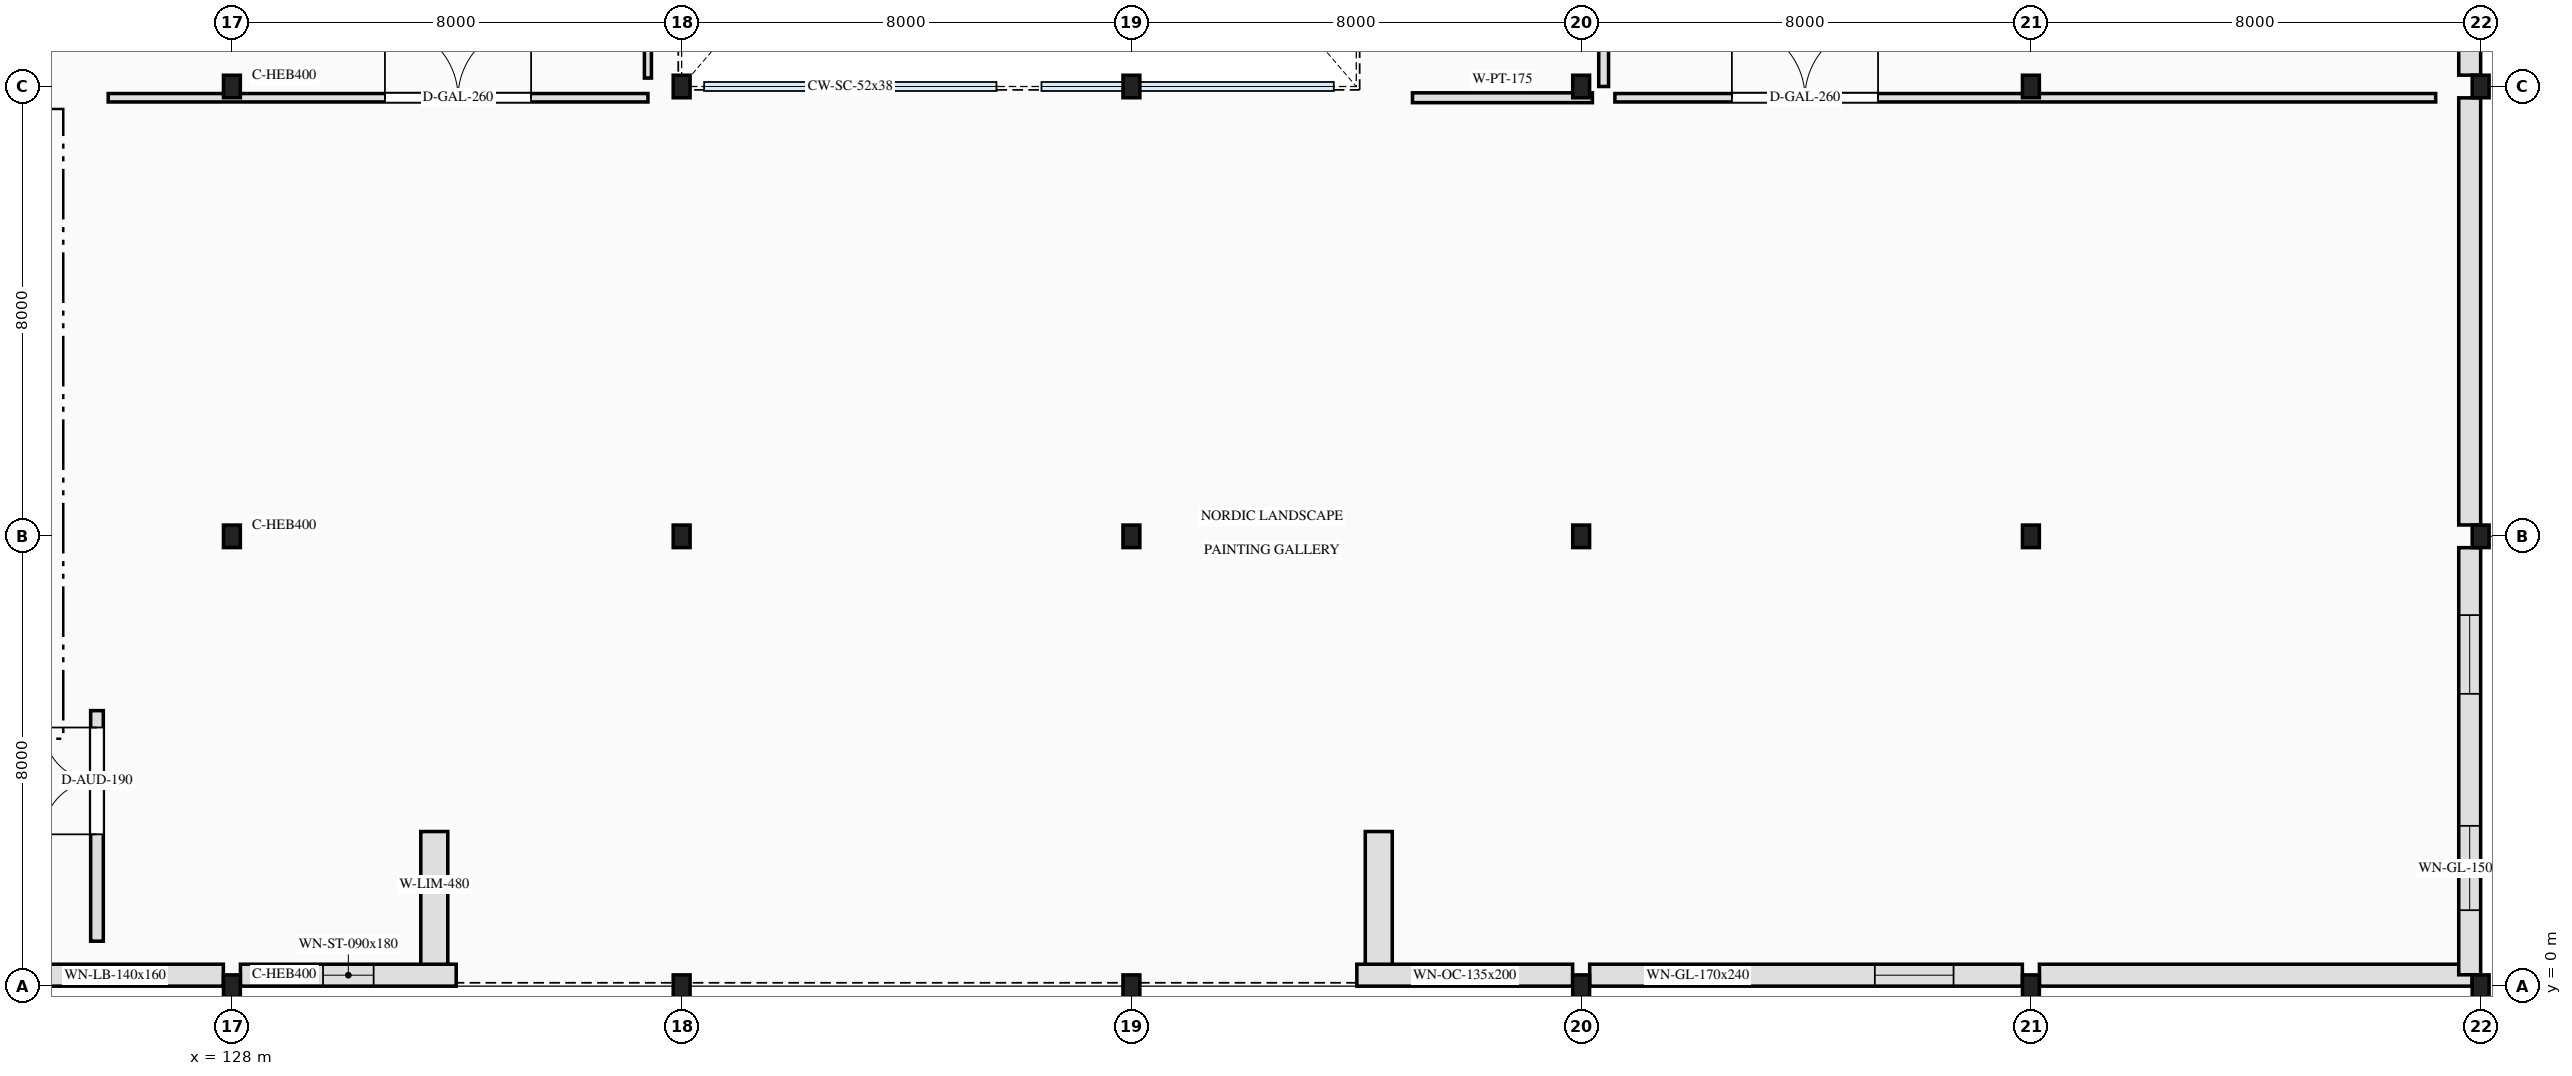
"""IFC4 building model, lengths in metres.
Left out: names, types, materials, properties, quantities, classifications, styles, units other than length and angle.
Written with IfcOpenShell. Run it as: python <this file> out.ifc"""

import sys

from ifc_helpers import new_model, si_unit, direction, frame, frame_2d, origin, origin_2d, place, context, subcontext, project, spatial, rectangle, i_section, extrude, element, fill, save


model = new_model("IFC4")
c1 = context("Model", 3, precision=1e-05, world=origin(), true_north=direction((0.0, 1.0)))
c2 = subcontext(c1, "Body", "Model", "MODEL_VIEW")
j1 = project(units=[si_unit("LENGTHUNIT", "METRE"), si_unit("PLANEANGLEUNIT", "RADIAN")], contexts=[c1])
p1 = place(None, origin())
s1 = spatial("IfcSite", under=j1, at=p1, CompositionType="ELEMENT")
p2 = place(p1, origin())
s2 = spatial("IfcBuilding", under=s1, at=p2, CompositionType="ELEMENT")
p3 = place(p2, frame((0.0, 0.0, 21.8)))
s3 = spatial("IfcBuildingStorey", under=s2, at=p3, CompositionType="ELEMENT", Elevation=21.8)
for number, where, z_axis, x_axis in (
    (1, (128.0, 0.0, 0.0), (0.0, 0.0, 1.0), (1.0, 0.0, 0.0)),
    (2, (128.0, 8.0, 0.0), (0.0, 0.0, 1.0), (1.0, 0.0, 0.0)),
    (3, (128.0, 16.0, 0.0), (0.0, 0.0, 1.0), (1.0, 0.0, 0.0)),
    (4, (136.0, 0.0, 0.0), (0.0, 0.0, 1.0), (1.0, 0.0, 0.0)),
    (5, (136.0, 8.0, 0.0), (0.0, 0.0, 1.0), (1.0, 0.0, 0.0)),
    (6, (136.0, 16.0, 0.0), (0.0, 0.0, 1.0), (1.0, 0.0, 0.0)),
    (7, (144.0, 0.0, 0.0), (0.0, 0.0, 1.0), (1.0, 0.0, 0.0)),
    (8, (144.0, 8.0, 0.0), (0.0, 0.0, 1.0), (1.0, 0.0, 0.0)),
    (9, (144.0, 16.0, 0.0), (0.0, 0.0, 1.0), (1.0, 0.0, 0.0)),
    (10, (152.0, 0.0, 0.0), (0.0, 0.0, 1.0), (1.0, 0.0, 0.0)),
    (11, (152.0, 8.0, 0.0), (0.0, 0.0, 1.0), (1.0, 0.0, 0.0)),
    (12, (152.0, 16.0, 0.0), (0.0, 0.0, 1.0), (1.0, 0.0, 0.0)),
    (13, (160.0, 0.0, 0.0), (0.0, 0.0, 1.0), (1.0, 0.0, 0.0)),
    (14, (160.0, 8.0, 0.0), (0.0, 0.0, 1.0), (1.0, 0.0, 0.0)),
    (15, (160.0, 16.0, 0.0), (0.0, 0.0, 1.0), (1.0, 0.0, 0.0)),
    (16, (168.0, 0.0, 0.0), (0.0, 0.0, 1.0), (1.0, 0.0, 0.0)),
    (17, (168.0, 8.0, 0.0), (0.0, 0.0, 1.0), (1.0, 0.0, 0.0)),
    (18, (168.0, 16.0, 0.0), (0.0, 0.0, 1.0), (1.0, 0.0, 0.0)),
):
    element("IfcColumn", number, at=place(p3, frame(where, z_axis=z_axis, x_axis=x_axis)), inside=s3, PredefinedType="COLUMN", context=c2, shape_type="SweptSolid", body=[
        extrude(i_section(OverallWidth=0.3, OverallDepth=0.4, WebThickness=0.013, FlangeThickness=0.024, FilletRadius=0.027, at=origin_2d()), origin(), (0.0, 0.0, 1.0), 4.2),
    ])
for number, where, z_axis, x_axis in (
    (19, (131.6, 0.24, 0.0), (0.0, 0.0, 1.0), (0.0, 1.0, 0.0)),
    (20, (148.4, 0.24, 0.0), (0.0, 0.0, 1.0), (0.0, 1.0, 0.0)),
):
    element("IfcWall", number, at=place(p3, frame(where, z_axis=z_axis, x_axis=x_axis)), inside=s3, PredefinedType="SOLIDWALL", context=c2, shape_type="SweptSolid", body=[
        extrude(rectangle(XDim=2.51, YDim=0.48, at=frame_2d((1.255, 0.0))), origin(), (0.0, 0.0, 1.0), 3.94),
    ])
p4 = place(p3, frame((127.848, 0.195, 0.0), z_axis=(0.0, 0.0, 1.0), x_axis=(-1.0, 0.0, 0.0)))
e21 = element("IfcWall", 21, at=p4, inside=s3, PredefinedType="SOLIDWALL", context=c2, shape_type="SweptSolid", body=[
    extrude(rectangle(XDim=7.696, YDim=0.39, at=frame_2d((3.848, 0.0))), origin(), (0.0, 0.0, 1.0), 3.415),
])
p5 = place(p4, frame((1.224, 0.0, 0.85)))
e22 = element("IfcOpeningElement", 22, at=p5, cuts=e21, PredefinedType="OPENING", context=c2, shape_type="SweptSolid", body=[
    extrude(rectangle(XDim=1.4, YDim=1.6, at=frame_2d((0.7, 0.8))), frame((0.0, 0.205, 0.0), z_axis=(0.0, -1.0, 0.0), x_axis=(1.0, 0.0, 0.0)), (0.0, 0.0, 1.0), 0.41),
])
p6 = place(p4, frame((5.072, 0.0, 0.85)))
e23 = element("IfcOpeningElement", 23, at=p6, cuts=e21, PredefinedType="OPENING", context=c2, shape_type="SweptSolid", body=[
    extrude(rectangle(XDim=1.4, YDim=1.6, at=frame_2d((0.7, 0.8))), frame((0.0, 0.205, 0.0), z_axis=(0.0, -1.0, 0.0), x_axis=(1.0, 0.0, 0.0)), (0.0, 0.0, 1.0), 0.41),
])
p7 = place(p3, frame((131.99, 0.195, 0.0), z_axis=(0.0, 0.0, 1.0), x_axis=(-1.0, 0.0, 0.0)))
e24 = element("IfcWall", 24, at=p7, inside=s3, PredefinedType="SOLIDWALL", context=c2, shape_type="SweptSolid", body=[
    extrude(rectangle(XDim=3.838, YDim=0.39, at=frame_2d((1.919, 0.0))), origin(), (0.0, 0.0, 1.0), 3.415),
])
p8 = place(p7, frame((1.469, 0.0, 0.85)))
e25 = element("IfcOpeningElement", 25, at=p8, cuts=e24, PredefinedType="OPENING", context=c2, shape_type="SweptSolid", body=[
    extrude(rectangle(XDim=0.9, YDim=1.8, at=frame_2d((0.45, 0.9))), frame((0.0, 0.205, 0.0), z_axis=(0.0, -1.0, 0.0), x_axis=(1.0, 0.0, 0.0)), (0.0, 0.0, 1.0), 0.41),
])
p9 = place(p3, frame((159.848, 0.195, 0.0), z_axis=(0.0, 0.0, 1.0), x_axis=(-1.0, 0.0, 0.0)))
e26 = element("IfcWall", 26, at=p9, inside=s3, PredefinedType="SOLIDWALL", context=c2, shape_type="SweptSolid", body=[
    extrude(rectangle(XDim=7.696, YDim=0.39, at=frame_2d((3.848, 0.0))), origin(), (0.0, 0.0, 1.0), 3.415),
])
p10 = place(p9, frame((1.224, 0.0, 0.85)))
e27 = element("IfcOpeningElement", 27, at=p10, cuts=e26, PredefinedType="OPENING", context=c2, shape_type="SweptSolid", body=[
    extrude(rectangle(XDim=1.4, YDim=1.6, at=frame_2d((0.7, 0.8))), frame((0.0, 0.205, 0.0), z_axis=(0.0, -1.0, 0.0), x_axis=(1.0, 0.0, 0.0)), (0.0, 0.0, 1.0), 0.41),
])
p11 = place(p9, frame((4.922, 0.0, 0.85)))
e28 = element("IfcOpeningElement", 28, at=p11, cuts=e26, PredefinedType="OPENING", context=c2, shape_type="SweptSolid", body=[
    extrude(rectangle(XDim=1.7, YDim=2.4, at=frame_2d((0.85, 1.2))), frame((0.0, 0.205, 0.0), z_axis=(0.0, -1.0, 0.0), x_axis=(1.0, 0.0, 0.0)), (0.0, 0.0, 1.0), 0.41),
])
p12 = place(p3, frame((167.848, 0.195, 0.0), z_axis=(0.0, 0.0, 1.0), x_axis=(-1.0, 0.0, 0.0)))
e29 = element("IfcWall", 29, at=p12, inside=s3, PredefinedType="SOLIDWALL", context=c2, shape_type="SweptSolid", body=[
    extrude(rectangle(XDim=7.696, YDim=0.39, at=frame_2d((3.848, 0.0))), origin(), (0.0, 0.0, 1.0), 3.415),
])
p13 = place(p3, frame((151.848, 0.195, 0.0), z_axis=(0.0, 0.0, 1.0), x_axis=(-1.0, 0.0, 0.0)))
e30 = element("IfcWall", 30, at=p13, inside=s3, PredefinedType="SOLIDWALL", context=c2, shape_type="SweptSolid", body=[
    extrude(rectangle(XDim=3.838, YDim=0.39, at=frame_2d((1.919, 0.0))), origin(), (0.0, 0.0, 1.0), 3.415),
])
p14 = place(p13, frame((1.244, 0.0, 0.85)))
e31 = element("IfcOpeningElement", 31, at=p14, cuts=e30, PredefinedType="OPENING", context=c2, shape_type="SweptSolid", body=[
    extrude(rectangle(XDim=1.35, YDim=2.0, at=frame_2d((0.675, 1.0))), frame((0.0, 0.205, 0.0), z_axis=(0.0, -1.0, 0.0), x_axis=(1.0, 0.0, 0.0)), (0.0, 0.0, 1.0), 0.41),
])
p15 = place(p3, frame((167.805, 7.798, 0.0), z_axis=(0.0, 0.0, 1.0), x_axis=(0.0, -1.0, 0.0)))
e32 = element("IfcWall", 32, at=p15, inside=s3, PredefinedType="SOLIDWALL", context=c2, shape_type="SweptSolid", body=[
    extrude(rectangle(XDim=7.596, YDim=0.39, at=frame_2d((3.798, 0.0))), origin(), (0.0, 0.0, 1.0), 3.415),
])
p16 = place(p15, frame((1.199, 0.0, 0.85)))
e33 = element("IfcOpeningElement", 33, at=p16, cuts=e32, PredefinedType="OPENING", context=c2, shape_type="SweptSolid", body=[
    extrude(rectangle(XDim=1.4, YDim=1.6, at=frame_2d((0.7, 0.8))), frame((0.0, 0.205, 0.0), z_axis=(0.0, -1.0, 0.0), x_axis=(1.0, 0.0, 0.0)), (0.0, 0.0, 1.0), 0.41),
])
p17 = place(p15, frame((4.947, 0.0, 0.85)))
e34 = element("IfcOpeningElement", 34, at=p17, cuts=e32, PredefinedType="OPENING", context=c2, shape_type="SweptSolid", body=[
    extrude(rectangle(XDim=1.5, YDim=2.4, at=frame_2d((0.75, 1.2))), frame((0.0, 0.205, 0.0), z_axis=(0.0, -1.0, 0.0), x_axis=(1.0, 0.0, 0.0)), (0.0, 0.0, 1.0), 0.41),
])
p18 = place(p3, frame((167.805, 15.798, 0.0), z_axis=(0.0, 0.0, 1.0), x_axis=(0.0, -1.0, 0.0)))
e35 = element("IfcWall", 35, at=p18, inside=s3, PredefinedType="SOLIDWALL", context=c2, shape_type="SweptSolid", body=[
    extrude(rectangle(XDim=7.596, YDim=0.39, at=frame_2d((3.798, 0.0))), origin(), (0.0, 0.0, 1.0), 3.415),
])
p19 = place(p3, frame((167.805, 23.798, 0.0), z_axis=(0.0, 0.0, 1.0), x_axis=(0.0, -1.0, 0.0)))
e36 = element("IfcWall", 36, at=p19, inside=s3, PredefinedType="SOLIDWALL", context=c2, shape_type="SweptSolid", body=[
    extrude(rectangle(XDim=7.596, YDim=0.39, at=frame_2d((3.798, 0.0))), origin(), (0.0, 0.0, 1.0), 3.415),
])
p20 = place(p19, frame((1.199, 0.0, 0.85)))
e37 = element("IfcOpeningElement", 37, at=p20, cuts=e36, PredefinedType="OPENING", context=c2, shape_type="SweptSolid", body=[
    extrude(rectangle(XDim=1.4, YDim=1.6, at=frame_2d((0.7, 0.8))), frame((0.0, 0.205, 0.0), z_axis=(0.0, -1.0, 0.0), x_axis=(1.0, 0.0, 0.0)), (0.0, 0.0, 1.0), 0.41),
])
p21 = place(p19, frame((4.947, 0.0, 0.85)))
e38 = element("IfcOpeningElement", 38, at=p21, cuts=e36, PredefinedType="OPENING", context=c2, shape_type="SweptSolid", body=[
    extrude(rectangle(XDim=1.5, YDim=2.4, at=frame_2d((0.75, 1.2))), frame((0.0, 0.205, 0.0), z_axis=(0.0, -1.0, 0.0), x_axis=(1.0, 0.0, 0.0)), (0.0, 0.0, 1.0), 0.41),
])
p22 = place(p3, frame((125.6, 0.8, 0.0), z_axis=(0.0, 0.0, 1.0), x_axis=(0.0, 1.0, 0.0)))
e39 = element("IfcWall", 39, at=p22, inside=s3, PredefinedType="SOLIDWALL", context=c2, shape_type="SweptSolid", body=[
    extrude(rectangle(XDim=4.1, YDim=0.225, at=frame_2d((2.05, 0.0))), origin(), (0.0, 0.0, 1.0), 3.92),
])
p23 = place(p22, frame((1.9, 0.0, 0.0)))
e40 = element("IfcOpeningElement", 40, at=p23, cuts=e39, PredefinedType="OPENING", context=c2, shape_type="SweptSolid", body=[
    extrude(rectangle(XDim=1.9, YDim=2.35, at=frame_2d((0.95, 1.175))), frame((0.0, 0.123, 0.0), z_axis=(0.0, -1.0, 0.0), x_axis=(1.0, 0.0, 0.0)), (0.0, 0.0, 1.0), 0.245),
])
p24 = place(p3, frame((149.0, 15.8, 0.0), z_axis=(0.0, 0.0, 1.0), x_axis=(1.0, 0.0, 0.0)))
e41 = element("IfcWall", 41, at=p24, inside=s3, PredefinedType="PARTITIONING", context=c2, shape_type="SweptSolid", body=[
    extrude(rectangle(XDim=3.2, YDim=0.175, at=frame_2d((1.6, 0.0))), origin(), (0.0, 0.0, 1.0), 3.48),
])
p25 = place(p3, frame((152.4, 16.0, 0.0), z_axis=(0.0, 0.0, 1.0), x_axis=(0.0, 1.0, 0.0)))
e42 = element("IfcWall", 42, at=p25, inside=s3, PredefinedType="PARTITIONING", context=c2, shape_type="SweptSolid", body=[
    extrude(rectangle(XDim=16.6, YDim=0.175, at=frame_2d((8.3, 0.0))), origin(), (0.0, 0.0, 1.0), 3.92),
])
p26 = place(p25, frame((3.12, 0.0, 0.0)))
e43 = element("IfcOpeningElement", 43, at=p26, cuts=e42, PredefinedType="OPENING", context=c2, shape_type="SweptSolid", body=[
    extrude(rectangle(XDim=1.9, YDim=2.35, at=frame_2d((0.95, 1.175))), frame((0.0, 0.097, 0.0), z_axis=(0.0, -1.0, 0.0), x_axis=(1.0, 0.0, 0.0)), (0.0, 0.0, 1.0), 0.195),
])
p27 = place(p3, frame((152.6, 15.8, 0.0), z_axis=(0.0, 0.0, 1.0), x_axis=(1.0, 0.0, 0.0)))
e44 = element("IfcWall", 44, at=p27, inside=s3, PredefinedType="PARTITIONING", context=c2, shape_type="SweptSolid", body=[
    extrude(rectangle(XDim=14.6, YDim=0.15, at=frame_2d((7.3, 0.0))), origin(), (0.0, 0.0, 1.0), 3.48),
])
p28 = place(p27, frame((2.081, 0.0, 0.0)))
e45 = element("IfcOpeningElement", 45, at=p28, cuts=e44, PredefinedType="OPENING", context=c2, shape_type="SweptSolid", body=[
    extrude(rectangle(XDim=2.6, YDim=2.9, at=frame_2d((1.3, 1.45))), frame((0.0, 0.085, 0.0), z_axis=(0.0, -1.0, 0.0), x_axis=(1.0, 0.0, 0.0)), (0.0, 0.0, 1.0), 0.17),
])
p29 = place(p3, frame((125.8, 15.8, 0.0), z_axis=(0.0, 0.0, 1.0), x_axis=(1.0, 0.0, 0.0)))
e46 = element("IfcWall", 46, at=p29, inside=s3, PredefinedType="PARTITIONING", context=c2, shape_type="SweptSolid", body=[
    extrude(rectangle(XDim=9.6, YDim=0.15, at=frame_2d((4.8, 0.0))), origin(), (0.0, 0.0, 1.0), 3.48),
])
p30 = place(p29, frame((4.922, 0.0, 0.0)))
e47 = element("IfcOpeningElement", 47, at=p30, cuts=e46, PredefinedType="OPENING", context=c2, shape_type="SweptSolid", body=[
    extrude(rectangle(XDim=2.6, YDim=2.9, at=frame_2d((1.3, 1.45))), frame((0.0, 0.085, 0.0), z_axis=(0.0, -1.0, 0.0), x_axis=(1.0, 0.0, 0.0)), (0.0, 0.0, 1.0), 0.17),
])
p31 = place(p3, frame((135.4, 16.15, 0.0), z_axis=(0.0, 0.0, 1.0), x_axis=(0.0, 1.0, 0.0)))
e48 = element("IfcWall", 48, at=p31, inside=s3, PredefinedType="PARTITIONING", context=c2, shape_type="SweptSolid", body=[
    extrude(rectangle(XDim=15.1, YDim=0.125, at=frame_2d((7.55, 0.0))), origin(), (0.0, 0.0, 1.0), 3.92),
])
p32 = place(p5, origin())
e49 = element("IfcWindow", 49, at=p32, inside=s3, PartitioningType="SINGLE_PANEL", PredefinedType="WINDOW", context=c2, shape_type="SweptSolid", body=[
    extrude(rectangle(XDim=1.4, YDim=1.6, at=frame_2d((0.7, 0.8))), frame((0.0, 0.03, 0.0), z_axis=(0.0, -1.0, 0.0), x_axis=(1.0, 0.0, 0.0)), (0.0, 0.0, 1.0), 0.06),
])
fill(e22, e49)
p33 = place(p8, origin())
e50 = element("IfcWindow", 50, at=p33, inside=s3, PartitioningType="SINGLE_PANEL", PredefinedType="WINDOW", context=c2, shape_type="SweptSolid", body=[
    extrude(rectangle(XDim=0.9, YDim=1.8, at=frame_2d((0.45, 0.9))), frame((0.0, 0.03, 0.0), z_axis=(0.0, -1.0, 0.0), x_axis=(1.0, 0.0, 0.0)), (0.0, 0.0, 1.0), 0.06),
])
fill(e25, e50)
p34 = place(p10, origin())
e51 = element("IfcWindow", 51, at=p34, inside=s3, PartitioningType="SINGLE_PANEL", PredefinedType="WINDOW", context=c2, shape_type="SweptSolid", body=[
    extrude(rectangle(XDim=1.4, YDim=1.6, at=frame_2d((0.7, 0.8))), frame((0.0, 0.03, 0.0), z_axis=(0.0, -1.0, 0.0), x_axis=(1.0, 0.0, 0.0)), (0.0, 0.0, 1.0), 0.06),
])
fill(e27, e51)
p35 = place(p11, origin())
e52 = element("IfcWindow", 52, at=p35, inside=s3, PartitioningType="DOUBLE_PANEL_VERTICAL", PredefinedType="WINDOW", context=c2, shape_type="SweptSolid", body=[
    extrude(rectangle(XDim=1.7, YDim=2.4, at=frame_2d((0.85, 1.2))), frame((0.0, 0.03, 0.0), z_axis=(0.0, -1.0, 0.0), x_axis=(1.0, 0.0, 0.0)), (0.0, 0.0, 1.0), 0.06),
])
fill(e28, e52)
p36 = place(p14, origin())
e53 = element("IfcWindow", 53, at=p36, inside=s3, PartitioningType="SINGLE_PANEL", PredefinedType="WINDOW", context=c2, shape_type="SweptSolid", body=[
    extrude(rectangle(XDim=1.35, YDim=2.0, at=frame_2d((0.675, 1.0))), frame((0.0, 0.03, 0.0), z_axis=(0.0, -1.0, 0.0), x_axis=(1.0, 0.0, 0.0)), (0.0, 0.0, 1.0), 0.06),
])
fill(e31, e53)
p37 = place(p16, origin())
e54 = element("IfcWindow", 54, at=p37, inside=s3, PartitioningType="SINGLE_PANEL", PredefinedType="WINDOW", context=c2, shape_type="SweptSolid", body=[
    extrude(rectangle(XDim=1.4, YDim=1.6, at=frame_2d((0.7, 0.8))), frame((0.0, 0.03, 0.0), z_axis=(0.0, -1.0, 0.0), x_axis=(1.0, 0.0, 0.0)), (0.0, 0.0, 1.0), 0.06),
])
fill(e33, e54)
p38 = place(p17, origin())
e55 = element("IfcWindow", 55, at=p38, inside=s3, PartitioningType="SINGLE_PANEL", PredefinedType="WINDOW", context=c2, shape_type="SweptSolid", body=[
    extrude(rectangle(XDim=1.5, YDim=2.4, at=frame_2d((0.75, 1.2))), frame((0.0, 0.03, 0.0), z_axis=(0.0, -1.0, 0.0), x_axis=(1.0, 0.0, 0.0)), (0.0, 0.0, 1.0), 0.06),
])
fill(e34, e55)
p39 = place(p23, origin())
e56 = element("IfcDoor", 56, at=p39, inside=s3, OperationType="DOUBLE_DOOR_SINGLE_SWING", PredefinedType="DOOR", context=c2, shape_type="SweptSolid", body=[
    extrude(rectangle(XDim=1.9, YDim=2.35, at=frame_2d((0.95, 1.175))), frame((0.0, 0.025, 0.0), z_axis=(0.0, -1.0, 0.0), x_axis=(1.0, 0.0, 0.0)), (0.0, 0.0, 1.0), 0.05),
])
fill(e40, e56)
p40 = place(p28, origin())
e57 = element("IfcDoor", 57, at=p40, inside=s3, OperationType="DOUBLE_DOOR_DOUBLE_SWING", PredefinedType="DOOR", context=c2, shape_type="SweptSolid", body=[
    extrude(rectangle(XDim=2.6, YDim=2.9, at=frame_2d((1.3, 1.45))), frame((0.0, 0.025, 0.0), z_axis=(0.0, -1.0, 0.0), x_axis=(1.0, 0.0, 0.0)), (0.0, 0.0, 1.0), 0.05),
])
fill(e45, e57)
p41 = place(p30, origin())
e58 = element("IfcDoor", 58, at=p41, inside=s3, OperationType="DOUBLE_DOOR_DOUBLE_SWING", PredefinedType="DOOR", context=c2, shape_type="SweptSolid", body=[
    extrude(rectangle(XDim=2.6, YDim=2.9, at=frame_2d((1.3, 1.45))), frame((0.0, 0.025, 0.0), z_axis=(0.0, -1.0, 0.0), x_axis=(1.0, 0.0, 0.0)), (0.0, 0.0, 1.0), 0.05),
])
fill(e47, e58)
save(model, sys.argv[1])
